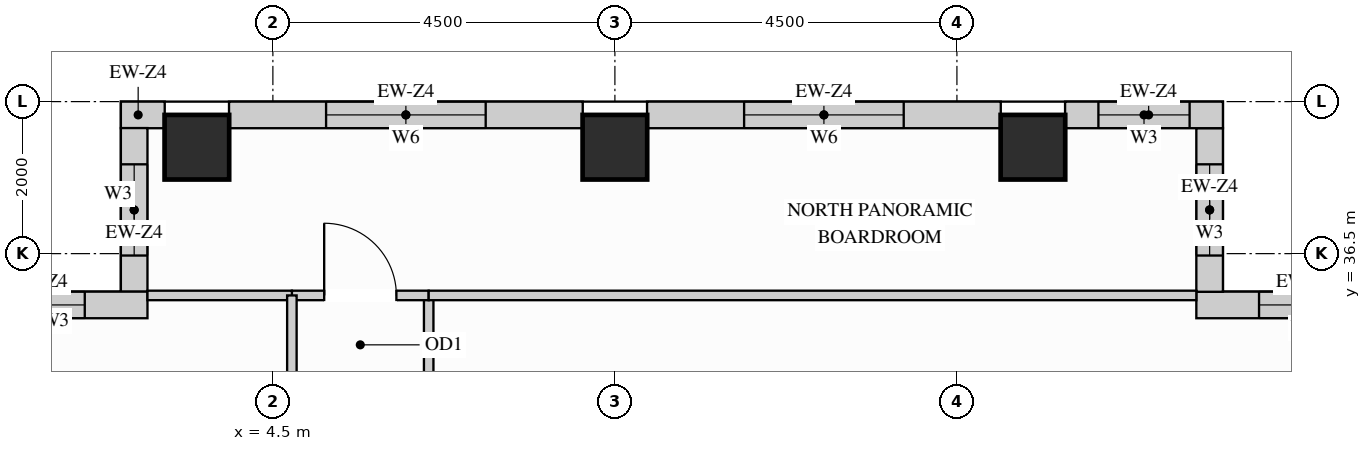
"""IFC4 building model, lengths in metres.
Left out: names, types, materials, properties, quantities, classifications, styles, units other than length and angle.
Written with IfcOpenShell. Run it as: python <this file> out.ifc"""

import sys

from ifc_helpers import new_model, si_unit, direction, frame, frame_2d, origin, origin_2d, place, context, subcontext, project, spatial, rectangle, extrude, source, transform, mapped, element, fill, save


model = new_model("IFC4")
c1 = context("Model", 3, precision=1e-05, world=origin(), true_north=direction((0.0, 1.0)))
c2 = subcontext(c1, "Body", "Model", "MODEL_VIEW")
j1 = project(units=[si_unit("LENGTHUNIT", "METRE"), si_unit("PLANEANGLEUNIT", "RADIAN")], contexts=[c1])
p1 = place(None, origin())
s1 = spatial("IfcSite", under=j1, at=p1, CompositionType="ELEMENT")
p2 = place(p1, origin())
s2 = spatial("IfcBuilding", under=s1, at=p2, CompositionType="ELEMENT")
p3 = place(p2, frame((0.0, 0.0, 252.0)))
s3 = spatial("IfcBuildingStorey", under=s2, at=p3, CompositionType="ELEMENT", Elevation=252.0)
m1 = source(origin(), c2, "Body", "SweptSolid", [
    extrude(rectangle(XDim=0.85, YDim=0.85, at=origin_2d()), origin(), (0.0, 0.0, 1.0), 3.4),
])
for number, where, z_axis, x_axis in (
    (1, (14.5, 37.9, 0.0), (0.0, 0.0, 1.0), (1.0, 0.0, 0.0)),
    (2, (3.5, 37.9, 0.0), (0.0, 0.0, 1.0), (1.0, 0.0, 0.0)),
    (3, (9.0, 37.9, 0.0), (0.0, 0.0, 1.0), (1.0, 0.0, 0.0)),
):
    element("IfcColumn", number, at=place(p3, frame(where, z_axis=z_axis, x_axis=x_axis)), inside=s3, PredefinedType="COLUMN", context=c2, shape_type="MappedRepresentation", body=[
        mapped(m1, transform((0.0, 0.0, 0.0), x_axis=(1.0, 0.0, 0.0), y_axis=(0.0, 1.0, 0.0), z_axis=(0.0, 0.0, 1.0))),
    ])
p4 = place(p3, frame((19.5, 35.825, 0.0), z_axis=(0.0, 0.0, 1.0), x_axis=(-1.0, 0.0, 0.0)))
e4 = element("IfcWall", 4, at=p4, inside=s3, PredefinedType="SOLIDWALL", context=c2, shape_type="SweptSolid", body=[
    extrude(rectangle(XDim=2.85, YDim=0.35, at=frame_2d((1.425, 0.0))), origin(), (0.0, 0.0, 1.0), 3.385),
])
p5 = place(p4, frame((0.825, 0.0, 0.78)))
e5 = element("IfcOpeningElement", 5, at=p5, cuts=e4, PredefinedType="OPENING", context=c2, shape_type="SweptSolid", body=[
    extrude(rectangle(XDim=1.2, YDim=2.25, at=frame_2d((0.6, 1.125))), frame((0.0, 0.185, 0.0), z_axis=(0.0, -1.0, 0.0), x_axis=(1.0, 0.0, 0.0)), (0.0, 0.0, 1.0), 0.37),
])
p6 = place(p3, frame((16.825, 35.998, 0.0), z_axis=(0.0, 0.0, 1.0), x_axis=(0.0, 1.0, 0.0)))
e6 = element("IfcWall", 6, at=p6, inside=s3, PredefinedType="SOLIDWALL", context=c2, shape_type="SweptSolid", body=[
    extrude(rectangle(XDim=2.154, YDim=0.35, at=frame_2d((1.077, 0.0))), origin(), (0.0, 0.0, 1.0), 3.385),
])
p7 = place(p6, frame((0.477, 0.0, 0.78)))
e7 = element("IfcOpeningElement", 7, at=p7, cuts=e6, PredefinedType="OPENING", context=c2, shape_type="SweptSolid", body=[
    extrude(rectangle(XDim=1.2, YDim=2.25, at=frame_2d((0.6, 1.125))), frame((0.0, 0.185, 0.0), z_axis=(0.0, -1.0, 0.0), x_axis=(1.0, 0.0, 0.0)), (0.0, 0.0, 1.0), 0.37),
])
p8 = place(p3, frame((17.0, 38.325, 0.0), z_axis=(0.0, 0.0, 1.0), x_axis=(-1.0, 0.0, 0.0)))
e8 = element("IfcWall", 8, at=p8, inside=s3, PredefinedType="SOLIDWALL", context=c2, shape_type="SweptSolid", body=[
    extrude(rectangle(XDim=2.077, YDim=0.35, at=frame_2d((1.039, 0.0))), origin(), (0.0, 0.0, 1.0), 3.385),
])
p9 = place(p8, frame((0.438, 0.0, 0.78)))
e9 = element("IfcOpeningElement", 9, at=p9, cuts=e8, PredefinedType="OPENING", context=c2, shape_type="SweptSolid", body=[
    extrude(rectangle(XDim=1.2, YDim=2.25, at=frame_2d((0.6, 1.125))), frame((0.0, 0.185, 0.0), z_axis=(0.0, -1.0, 0.0), x_axis=(1.0, 0.0, 0.0)), (0.0, 0.0, 1.0), 0.37),
])
p10 = place(p3, frame((14.077, 38.325, 0.0), z_axis=(0.0, 0.0, 1.0), x_axis=(-1.0, 0.0, 0.0)))
e10 = element("IfcWall", 10, at=p10, inside=s3, PredefinedType="SOLIDWALL", context=c2, shape_type="SweptSolid", body=[
    extrude(rectangle(XDim=4.654, YDim=0.35, at=frame_2d((2.327, 0.0))), origin(), (0.0, 0.0, 1.0), 3.385),
])
p11 = place(p10, frame((1.277, 0.0, 0.78)))
e11 = element("IfcOpeningElement", 11, at=p11, cuts=e10, PredefinedType="OPENING", context=c2, shape_type="SweptSolid", body=[
    extrude(rectangle(XDim=2.1, YDim=2.25, at=frame_2d((1.05, 1.125))), frame((0.0, 0.185, 0.0), z_axis=(0.0, -1.0, 0.0), x_axis=(1.0, 0.0, 0.0)), (0.0, 0.0, 1.0), 0.37),
])
p12 = place(p3, frame((8.577, 38.325, 0.0), z_axis=(0.0, 0.0, 1.0), x_axis=(-1.0, 0.0, 0.0)))
e12 = element("IfcWall", 12, at=p12, inside=s3, PredefinedType="SOLIDWALL", context=c2, shape_type="SweptSolid", body=[
    extrude(rectangle(XDim=4.654, YDim=0.35, at=frame_2d((2.327, 0.0))), origin(), (0.0, 0.0, 1.0), 3.385),
])
p13 = place(p12, frame((1.277, 0.0, 0.78)))
e13 = element("IfcOpeningElement", 13, at=p13, cuts=e12, PredefinedType="OPENING", context=c2, shape_type="SweptSolid", body=[
    extrude(rectangle(XDim=2.1, YDim=2.25, at=frame_2d((1.05, 1.125))), frame((0.0, 0.185, 0.0), z_axis=(0.0, -1.0, 0.0), x_axis=(1.0, 0.0, 0.0)), (0.0, 0.0, 1.0), 0.37),
])
m2 = source(origin(), c2, "Body", "SweptSolid", [
    extrude(rectangle(XDim=0.577, YDim=0.35, at=frame_2d((0.289, 0.0))), origin(), (0.0, 0.0, 1.0), 3.385),
])
p14 = place(p3, frame((3.077, 38.325, 0.0), z_axis=(0.0, 0.0, 1.0), x_axis=(-1.0, 0.0, 0.0)))
e14 = element("IfcWall", 14, at=p14, inside=s3, PredefinedType="SOLIDWALL", context=c2, shape_type="MappedRepresentation", body=[
    mapped(m2, transform((0.0, 0.0, 0.0), x_axis=(1.0, 0.0, 0.0), y_axis=(0.0, 1.0, 0.0), z_axis=(0.0, 0.0, 1.0))),
])
p15 = place(p3, frame((2.675, 38.152, 0.0), z_axis=(0.0, 0.0, 1.0), x_axis=(0.0, -1.0, 0.0)))
e15 = element("IfcWall", 15, at=p15, inside=s3, PredefinedType="SOLIDWALL", context=c2, shape_type="SweptSolid", body=[
    extrude(rectangle(XDim=2.154, YDim=0.35, at=frame_2d((1.077, 0.0))), origin(), (0.0, 0.0, 1.0), 3.385),
])
p16 = place(p15, frame((0.477, 0.0, 0.78)))
e16 = element("IfcOpeningElement", 16, at=p16, cuts=e15, PredefinedType="OPENING", context=c2, shape_type="SweptSolid", body=[
    extrude(rectangle(XDim=1.2, YDim=2.25, at=frame_2d((0.6, 1.125))), frame((0.0, 0.185, 0.0), z_axis=(0.0, -1.0, 0.0), x_axis=(1.0, 0.0, 0.0)), (0.0, 0.0, 1.0), 0.37),
])
p17 = place(p3, frame((2.85, 35.825, 0.0), z_axis=(0.0, 0.0, 1.0), x_axis=(-1.0, 0.0, 0.0)))
e17 = element("IfcWall", 17, at=p17, inside=s3, PredefinedType="SOLIDWALL", context=c2, shape_type="SweptSolid", body=[
    extrude(rectangle(XDim=2.85, YDim=0.35, at=frame_2d((1.425, 0.0))), origin(), (0.0, 0.0, 1.0), 3.385),
])
p18 = place(p17, frame((0.825, 0.0, 0.78)))
e18 = element("IfcOpeningElement", 18, at=p18, cuts=e17, PredefinedType="OPENING", context=c2, shape_type="SweptSolid", body=[
    extrude(rectangle(XDim=1.2, YDim=2.25, at=frame_2d((0.6, 1.125))), frame((0.0, 0.185, 0.0), z_axis=(0.0, -1.0, 0.0), x_axis=(1.0, 0.0, 0.0)), (0.0, 0.0, 1.0), 0.37),
])
p19 = place(p3, frame((6.55, 32.85, 0.0), z_axis=(0.0, 0.0, 1.0), x_axis=(0.0, 1.0, 0.0)))
e19 = element("IfcWall", 19, at=p19, inside=s3, PredefinedType="PARTITIONING", context=c2, shape_type="SweptSolid", body=[
    extrude(rectangle(XDim=3.1, YDim=0.125, at=frame_2d((1.55, 0.0))), origin(), (0.0, 0.0, 1.0), 3.385),
])
p20 = place(p19, frame((1.075, 0.0, 0.0)))
e20 = element("IfcOpeningElement", 20, at=p20, cuts=e19, PredefinedType="OPENING", context=c2, shape_type="SweptSolid", body=[
    extrude(rectangle(XDim=0.95, YDim=2.15, at=frame_2d((0.475, 1.075))), frame((0.0, 0.073, 0.0), z_axis=(0.0, -1.0, 0.0), x_axis=(1.0, 0.0, 0.0)), (0.0, 0.0, 1.0), 0.145),
])
p21 = place(p3, frame((4.75, 35.95, 0.0), z_axis=(0.0, 0.0, 1.0), x_axis=(1.0, 0.0, 0.0)))
e21 = element("IfcWall", 21, at=p21, inside=s3, PredefinedType="PARTITIONING", context=c2, shape_type="SweptSolid", body=[
    extrude(rectangle(XDim=1.8, YDim=0.125, at=frame_2d((0.9, 0.0))), origin(), (0.0, 0.0, 1.0), 3.385),
])
p22 = place(p21, frame((0.425, 0.0, 0.0)))
e22 = element("IfcOpeningElement", 22, at=p22, cuts=e21, PredefinedType="OPENING", context=c2, shape_type="SweptSolid", body=[
    extrude(rectangle(XDim=0.95, YDim=2.15, at=frame_2d((0.475, 1.075))), frame((0.0, 0.073, 0.0), z_axis=(0.0, -1.0, 0.0), x_axis=(1.0, 0.0, 0.0)), (0.0, 0.0, 1.0), 0.145),
])
m3 = source(origin(), c2, "Body", "SweptSolid", [
    extrude(rectangle(XDim=10.1, YDim=0.125, at=frame_2d((5.05, 0.0))), origin(), (0.0, 0.0, 1.0), 3.385),
])
p23 = place(p3, frame((6.55, 35.95, 0.0), z_axis=(0.0, 0.0, 1.0), x_axis=(1.0, 0.0, 0.0)))
e23 = element("IfcWall", 23, at=p23, inside=s3, PredefinedType="PARTITIONING", context=c2, shape_type="MappedRepresentation", body=[
    mapped(m3, transform((0.0, 0.0, 0.0), x_axis=(1.0, 0.0, 0.0), y_axis=(0.0, 1.0, 0.0), z_axis=(0.0, 0.0, 1.0))),
])
m4 = source(origin(), c2, "Body", "SweptSolid", [
    extrude(rectangle(XDim=1.9, YDim=0.125, at=frame_2d((0.95, 0.0))), origin(), (0.0, 0.0, 1.0), 3.385),
])
p24 = place(p3, frame((2.85, 35.95, 0.0), z_axis=(0.0, 0.0, 1.0), x_axis=(1.0, 0.0, 0.0)))
e24 = element("IfcWall", 24, at=p24, inside=s3, PredefinedType="PARTITIONING", context=c2, shape_type="MappedRepresentation", body=[
    mapped(m4, transform((0.0, 0.0, 0.0), x_axis=(1.0, 0.0, 0.0), y_axis=(0.0, 1.0, 0.0), z_axis=(0.0, 0.0, 1.0))),
])
p25 = place(p3, frame((4.75, 32.85, 0.0), z_axis=(0.0, 0.0, 1.0), x_axis=(0.0, 1.0, 0.0)))
e25 = element("IfcWall", 25, at=p25, inside=s3, PredefinedType="PARTITIONING", context=c2, shape_type="SweptSolid", body=[
    extrude(rectangle(XDim=3.1, YDim=0.125, at=frame_2d((1.55, 0.0))), origin(), (0.0, 0.0, 1.0), 3.385),
])
p26 = place(p25, frame((1.075, 0.0, 0.0)))
e26 = element("IfcOpeningElement", 26, at=p26, cuts=e25, PredefinedType="OPENING", context=c2, shape_type="SweptSolid", body=[
    extrude(rectangle(XDim=0.95, YDim=2.15, at=frame_2d((0.475, 1.075))), frame((0.0, 0.073, 0.0), z_axis=(0.0, -1.0, 0.0), x_axis=(1.0, 0.0, 0.0)), (0.0, 0.0, 1.0), 0.145),
])
m5 = source(origin(), c2, "Body", "SweptSolid", [
    extrude(rectangle(XDim=0.95, YDim=2.15, at=frame_2d((0.475, 1.075))), frame((0.0, 0.025, 0.0), z_axis=(0.0, -1.0, 0.0), x_axis=(1.0, 0.0, 0.0)), (0.0, 0.0, 1.0), 0.05),
])
p27 = place(p22, origin())
e27 = element("IfcDoor", 27, at=p27, inside=s3, OperationType="SINGLE_SWING_LEFT", PredefinedType="DOOR", context=c2, shape_type="MappedRepresentation", body=[
    mapped(m5, transform((0.0, 0.0, 0.0), x_axis=(1.0, 0.0, 0.0), y_axis=(0.0, 1.0, 0.0), z_axis=(0.0, 0.0, 1.0))),
])
fill(e22, e27)
m6 = source(origin(), c2, "Body", "SweptSolid", [
    extrude(rectangle(XDim=1.2, YDim=2.25, at=frame_2d((0.6, 1.125))), frame((0.0, 0.03, 0.0), z_axis=(0.0, -1.0, 0.0), x_axis=(1.0, 0.0, 0.0)), (0.0, 0.0, 1.0), 0.06),
])
p28 = place(p5, origin())
e28 = element("IfcWindow", 28, at=p28, inside=s3, PartitioningType="SINGLE_PANEL", PredefinedType="WINDOW", context=c2, shape_type="MappedRepresentation", body=[
    mapped(m6, transform((0.0, 0.0, 0.0), x_axis=(1.0, 0.0, 0.0), y_axis=(0.0, 1.0, 0.0), z_axis=(0.0, 0.0, 1.0))),
])
fill(e5, e28)
p29 = place(p7, origin())
e29 = element("IfcWindow", 29, at=p29, inside=s3, PartitioningType="SINGLE_PANEL", PredefinedType="WINDOW", context=c2, shape_type="MappedRepresentation", body=[
    mapped(m6, transform((0.0, 0.0, 0.0), x_axis=(1.0, 0.0, 0.0), y_axis=(0.0, 1.0, 0.0), z_axis=(0.0, 0.0, 1.0))),
])
fill(e7, e29)
p30 = place(p9, origin())
e30 = element("IfcWindow", 30, at=p30, inside=s3, PartitioningType="SINGLE_PANEL", PredefinedType="WINDOW", context=c2, shape_type="MappedRepresentation", body=[
    mapped(m6, transform((0.0, 0.0, 0.0), x_axis=(1.0, 0.0, 0.0), y_axis=(0.0, 1.0, 0.0), z_axis=(0.0, 0.0, 1.0))),
])
fill(e9, e30)
p31 = place(p16, origin())
e31 = element("IfcWindow", 31, at=p31, inside=s3, PartitioningType="SINGLE_PANEL", PredefinedType="WINDOW", context=c2, shape_type="MappedRepresentation", body=[
    mapped(m6, transform((0.0, 0.0, 0.0), x_axis=(1.0, 0.0, 0.0), y_axis=(0.0, 1.0, 0.0), z_axis=(0.0, 0.0, 1.0))),
])
fill(e16, e31)
p32 = place(p18, origin())
e32 = element("IfcWindow", 32, at=p32, inside=s3, PartitioningType="SINGLE_PANEL", PredefinedType="WINDOW", context=c2, shape_type="MappedRepresentation", body=[
    mapped(m6, transform((0.0, 0.0, 0.0), x_axis=(1.0, 0.0, 0.0), y_axis=(0.0, 1.0, 0.0), z_axis=(0.0, 0.0, 1.0))),
])
fill(e18, e32)
m7 = source(origin(), c2, "Body", "SweptSolid", [
    extrude(rectangle(XDim=2.1, YDim=2.25, at=frame_2d((1.05, 1.125))), frame((0.0, 0.03, 0.0), z_axis=(0.0, -1.0, 0.0), x_axis=(1.0, 0.0, 0.0)), (0.0, 0.0, 1.0), 0.06),
])
p33 = place(p11, origin())
e33 = element("IfcWindow", 33, at=p33, inside=s3, PartitioningType="SINGLE_PANEL", PredefinedType="WINDOW", context=c2, shape_type="MappedRepresentation", body=[
    mapped(m7, transform((0.0, 0.0, 0.0), x_axis=(1.0, 0.0, 0.0), y_axis=(0.0, 1.0, 0.0), z_axis=(0.0, 0.0, 1.0))),
])
fill(e11, e33)
p34 = place(p13, origin())
e34 = element("IfcWindow", 34, at=p34, inside=s3, PartitioningType="SINGLE_PANEL", PredefinedType="WINDOW", context=c2, shape_type="MappedRepresentation", body=[
    mapped(m7, transform((0.0, 0.0, 0.0), x_axis=(1.0, 0.0, 0.0), y_axis=(0.0, 1.0, 0.0), z_axis=(0.0, 0.0, 1.0))),
])
fill(e13, e34)
save(model, sys.argv[1])
